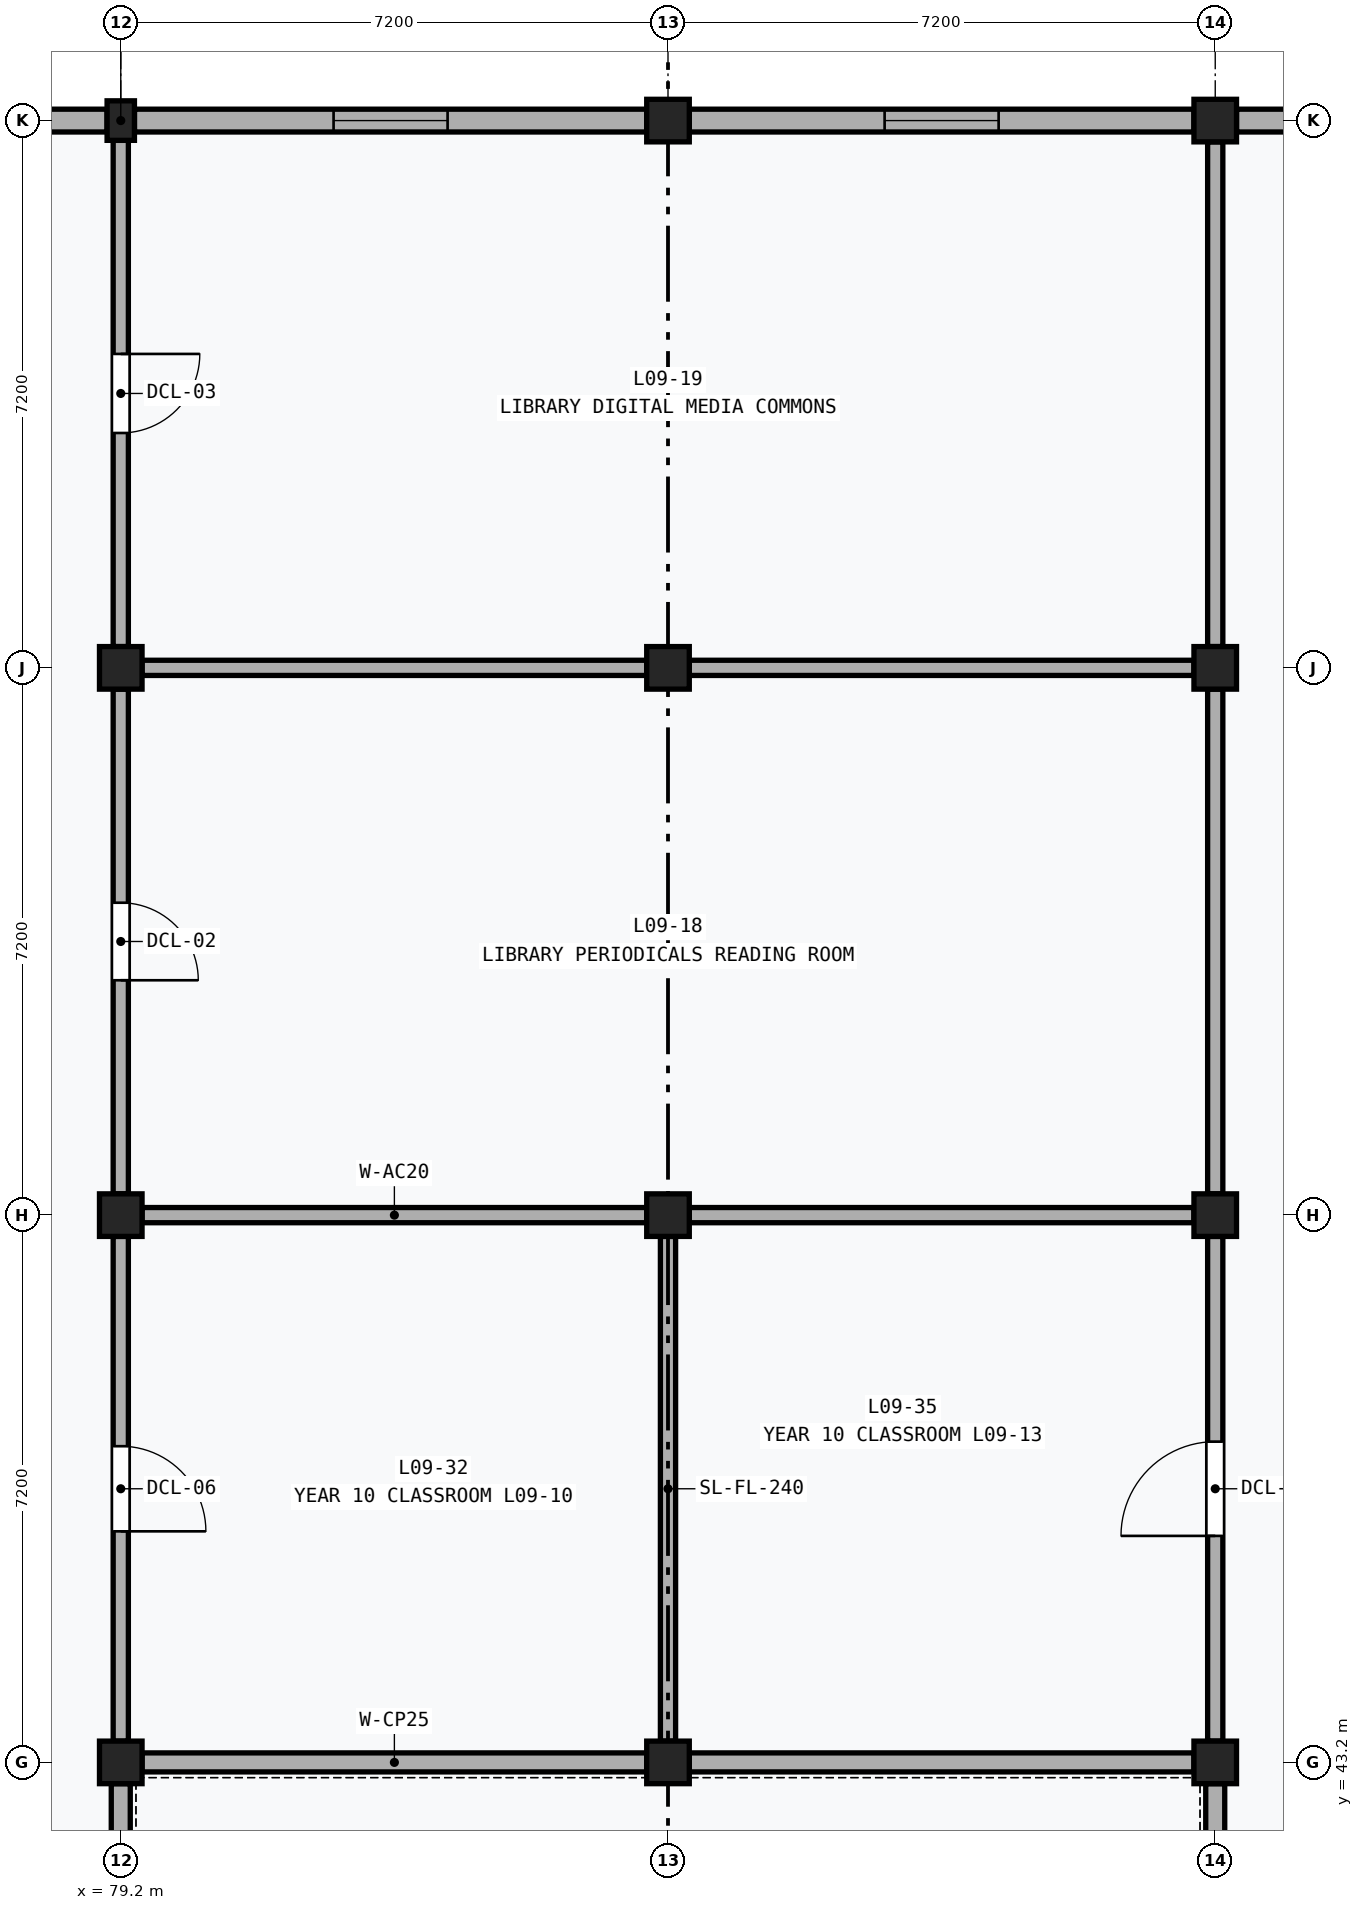
"""IFC4 building model, lengths in metres.
Left out: names, types, materials, properties, quantities, classifications, styles, units other than length and angle.
Written with IfcOpenShell. Run it as: python <this file> out.ifc"""

import sys

from ifc_helpers import new_model, si_unit, direction, frame, frame_2d, origin, origin_2d, place, context, subcontext, project, spatial, rectangle, extrude, element, fill, save


model = new_model("IFC4")
c1 = context("Model", 3, precision=1e-05, world=origin(), true_north=direction((0.0, 1.0)))
c2 = subcontext(c1, "Body", "Model", "MODEL_VIEW")
j1 = project(units=[si_unit("LENGTHUNIT", "METRE"), si_unit("PLANEANGLEUNIT", "RADIAN")], contexts=[c1])
p1 = place(None, origin())
s1 = spatial("IfcSite", under=j1, at=p1, CompositionType="ELEMENT")
p2 = place(p1, origin())
s2 = spatial("IfcBuilding", under=s1, at=p2, CompositionType="ELEMENT")
p3 = place(p2, frame((0.0, 0.0, 38.8)))
s3 = spatial("IfcBuildingStorey", under=s2, at=p3, CompositionType="ELEMENT", Elevation=38.8)
for number, where, z_axis, x_axis in (
    (1, (79.2, 43.2, 0.0), (0.0, 0.0, 1.0), (1.0, 0.0, 0.0)),
    (2, (79.2, 50.4, 0.0), (0.0, 0.0, 1.0), (1.0, 0.0, 0.0)),
    (3, (79.2, 57.6, 0.0), (0.0, 0.0, 1.0), (1.0, 0.0, 0.0)),
):
    element("IfcColumn", number, at=place(p3, frame(where, z_axis=z_axis, x_axis=x_axis)), inside=s3, PredefinedType="COLUMN", context=c2, shape_type="SweptSolid", body=[
        extrude(rectangle(XDim=0.56, YDim=0.56, at=origin_2d()), origin(), (0.0, 0.0, 1.0), 4.0),
    ])
p4 = place(p3, frame((79.2, 64.8, 0.0), z_axis=(0.0, 0.0, 1.0), x_axis=(1.0, 0.0, 0.0)))
e4 = element("IfcColumn", 4, at=p4, inside=s3, PredefinedType="PILASTER", context=c2, shape_type="SweptSolid", body=[
    extrude(rectangle(XDim=0.36, YDim=0.52, at=origin_2d()), origin(), (0.0, 0.0, 1.0), 4.0),
])
for number, where, z_axis, x_axis in (
    (5, (86.4, 43.2, 0.0), (0.0, 0.0, 1.0), (1.0, 0.0, 0.0)),
    (6, (86.4, 50.4, 0.0), (0.0, 0.0, 1.0), (1.0, 0.0, 0.0)),
    (7, (86.4, 57.6, 0.0), (0.0, 0.0, 1.0), (1.0, 0.0, 0.0)),
    (8, (86.4, 64.8, 0.0), (0.0, 0.0, 1.0), (1.0, 0.0, 0.0)),
    (9, (93.6, 43.2, 0.0), (0.0, 0.0, 1.0), (1.0, 0.0, 0.0)),
    (10, (93.6, 50.4, 0.0), (0.0, 0.0, 1.0), (1.0, 0.0, 0.0)),
    (11, (93.6, 57.6, 0.0), (0.0, 0.0, 1.0), (1.0, 0.0, 0.0)),
    (12, (93.6, 64.8, 0.0), (0.0, 0.0, 1.0), (1.0, 0.0, 0.0)),
):
    element("IfcColumn", number, at=place(p3, frame(where, z_axis=z_axis, x_axis=x_axis)), inside=s3, PredefinedType="COLUMN", context=c2, shape_type="SweptSolid", body=[
        extrude(rectangle(XDim=0.56, YDim=0.56, at=origin_2d()), origin(), (0.0, 0.0, 1.0), 4.0),
    ])
p5 = place(p3, frame((72.28, 64.8, 0.0), z_axis=(0.0, 0.0, 1.0), x_axis=(1.0, 0.0, 0.0)))
e13 = element("IfcWall", 13, at=p5, inside=s3, PredefinedType="SOLIDWALL", context=c2, shape_type="SweptSolid", body=[
    extrude(rectangle(XDim=6.74, YDim=0.3, at=frame_2d((3.37, 0.0))), origin(), (0.0, 0.0, 1.0), 3.17),
])
p6 = place(p5, frame((2.62, 0.0, 1.1)))
e14 = element("IfcOpeningElement", 14, at=p6, cuts=e13, PredefinedType="OPENING", context=c2, shape_type="SweptSolid", body=[
    extrude(rectangle(XDim=1.5, YDim=1.35, at=frame_2d((0.75, 0.675))), frame((0.0, 0.162, 0.0), z_axis=(0.0, -1.0, 0.0), x_axis=(1.0, 0.0, 0.0)), (0.0, 0.0, 1.0), 0.324),
])
p7 = place(p3, frame((79.38, 64.8, 0.0), z_axis=(0.0, 0.0, 1.0), x_axis=(1.0, 0.0, 0.0)))
e15 = element("IfcWall", 15, at=p7, inside=s3, PredefinedType="SOLIDWALL", context=c2, shape_type="SweptSolid", body=[
    extrude(rectangle(XDim=6.74, YDim=0.3, at=frame_2d((3.37, 0.0))), origin(), (0.0, 0.0, 1.0), 3.17),
])
p8 = place(p7, frame((2.62, 0.0, 1.1)))
e16 = element("IfcOpeningElement", 16, at=p8, cuts=e15, PredefinedType="OPENING", context=c2, shape_type="SweptSolid", body=[
    extrude(rectangle(XDim=1.5, YDim=1.35, at=frame_2d((0.75, 0.675))), frame((0.0, 0.162, 0.0), z_axis=(0.0, -1.0, 0.0), x_axis=(1.0, 0.0, 0.0)), (0.0, 0.0, 1.0), 0.324),
])
p9 = place(p3, frame((86.68, 64.8, 0.0), z_axis=(0.0, 0.0, 1.0), x_axis=(1.0, 0.0, 0.0)))
e17 = element("IfcWall", 17, at=p9, inside=s3, PredefinedType="SOLIDWALL", context=c2, shape_type="SweptSolid", body=[
    extrude(rectangle(XDim=6.64, YDim=0.3, at=frame_2d((3.32, 0.0))), origin(), (0.0, 0.0, 1.0), 3.17),
])
p10 = place(p9, frame((2.57, 0.0, 1.1)))
e18 = element("IfcOpeningElement", 18, at=p10, cuts=e17, PredefinedType="OPENING", context=c2, shape_type="SweptSolid", body=[
    extrude(rectangle(XDim=1.5, YDim=1.35, at=frame_2d((0.75, 0.675))), frame((0.0, 0.162, 0.0), z_axis=(0.0, -1.0, 0.0), x_axis=(1.0, 0.0, 0.0)), (0.0, 0.0, 1.0), 0.324),
])
p11 = place(p3, frame((93.88, 64.8, 0.0), z_axis=(0.0, 0.0, 1.0), x_axis=(1.0, 0.0, 0.0)))
e19 = element("IfcWall", 19, at=p11, inside=s3, PredefinedType="SOLIDWALL", context=c2, shape_type="SweptSolid", body=[
    extrude(rectangle(XDim=6.64, YDim=0.3, at=frame_2d((3.32, 0.0))), origin(), (0.0, 0.0, 1.0), 3.17),
])
p12 = place(p11, frame((2.42, 0.0, 0.9)))
e20 = element("IfcOpeningElement", 20, at=p12, cuts=e19, PredefinedType="OPENING", context=c2, shape_type="SweptSolid", body=[
    extrude(rectangle(XDim=1.8, YDim=1.8, at=frame_2d((0.9, 0.9))), frame((0.0, 0.162, 0.0), z_axis=(0.0, -1.0, 0.0), x_axis=(1.0, 0.0, 0.0)), (0.0, 0.0, 1.0), 0.324),
])
p13 = place(p3, frame((79.48, 43.2, 0.0), z_axis=(0.0, 0.0, 1.0), x_axis=(1.0, 0.0, 0.0)))
e21 = element("IfcWall", 21, at=p13, inside=s3, PredefinedType="PARTITIONING", context=c2, shape_type="SweptSolid", body=[
    extrude(rectangle(XDim=6.64, YDim=0.25, at=frame_2d((3.32, 0.0))), origin(), (0.0, 0.0, 1.0), 3.01),
])
p14 = place(p3, frame((79.2, 36.28, 0.0), z_axis=(0.0, 0.0, 1.0), x_axis=(0.0, 1.0, 0.0)))
e22 = element("IfcWall", 22, at=p14, inside=s3, PredefinedType="PARTITIONING", context=c2, shape_type="SweptSolid", body=[
    extrude(rectangle(XDim=6.64, YDim=0.25, at=frame_2d((3.32, 0.0))), origin(), (0.0, 0.0, 1.0), 3.01),
])
p15 = place(p3, frame((86.68, 43.2, 0.0), z_axis=(0.0, 0.0, 1.0), x_axis=(1.0, 0.0, 0.0)))
e23 = element("IfcWall", 23, at=p15, inside=s3, PredefinedType="PARTITIONING", context=c2, shape_type="SweptSolid", body=[
    extrude(rectangle(XDim=6.64, YDim=0.25, at=frame_2d((3.32, 0.0))), origin(), (0.0, 0.0, 1.0), 3.01),
])
p16 = place(p3, frame((93.6, 36.28, 0.0), z_axis=(0.0, 0.0, 1.0), x_axis=(0.0, 1.0, 0.0)))
e24 = element("IfcWall", 24, at=p16, inside=s3, PredefinedType="PARTITIONING", context=c2, shape_type="SweptSolid", body=[
    extrude(rectangle(XDim=6.64, YDim=0.25, at=frame_2d((3.32, 0.0))), origin(), (0.0, 0.0, 1.0), 3.01),
])
for number, where, z_axis, x_axis in (
    (25, (79.48, 50.4, 0.0), (0.0, 0.0, 1.0), (1.0, 0.0, 0.0)),
    (26, (79.48, 57.6, 0.0), (0.0, 0.0, 1.0), (1.0, 0.0, 0.0)),
):
    element("IfcWall", number, at=place(p3, frame(where, z_axis=z_axis, x_axis=x_axis)), inside=s3, PredefinedType="PARTITIONING", context=c2, shape_type="SweptSolid", body=[
        extrude(rectangle(XDim=6.64, YDim=0.2, at=frame_2d((3.32, 0.0))), origin(), (0.0, 0.0, 1.0), 3.01),
    ])
p17 = place(p3, frame((79.2, 50.68, 0.0), z_axis=(0.0, 0.0, 1.0), x_axis=(0.0, 1.0, 0.0)))
e27 = element("IfcWall", 27, at=p17, inside=s3, PredefinedType="PARTITIONING", context=c2, shape_type="SweptSolid", body=[
    extrude(rectangle(XDim=6.64, YDim=0.2, at=frame_2d((3.32, 0.0))), origin(), (0.0, 0.0, 1.0), 3.01),
])
p18 = place(p17, frame((2.81, 0.0, 0.0)))
e28 = element("IfcOpeningElement", 28, at=p18, cuts=e27, PredefinedType="OPENING", context=c2, shape_type="SweptSolid", body=[
    extrude(rectangle(XDim=1.02, YDim=2.12, at=frame_2d((0.51, 1.06))), frame((0.0, 0.112, 0.0), z_axis=(0.0, -1.0, 0.0), x_axis=(1.0, 0.0, 0.0)), (0.0, 0.0, 1.0), 0.224),
])
for number, where, z_axis, x_axis in (
    (29, (86.68, 50.4, 0.0), (0.0, 0.0, 1.0), (1.0, 0.0, 0.0)),
    (30, (86.68, 57.6, 0.0), (0.0, 0.0, 1.0), (1.0, 0.0, 0.0)),
    (31, (93.6, 50.68, 0.0), (0.0, 0.0, 1.0), (0.0, 1.0, 0.0)),
):
    element("IfcWall", number, at=place(p3, frame(where, z_axis=z_axis, x_axis=x_axis)), inside=s3, PredefinedType="PARTITIONING", context=c2, shape_type="SweptSolid", body=[
        extrude(rectangle(XDim=6.64, YDim=0.2, at=frame_2d((3.32, 0.0))), origin(), (0.0, 0.0, 1.0), 3.01),
    ])
p19 = place(p3, frame((79.2, 57.88, 0.0), z_axis=(0.0, 0.0, 1.0), x_axis=(0.0, 1.0, 0.0)))
e32 = element("IfcWall", 32, at=p19, inside=s3, PredefinedType="PARTITIONING", context=c2, shape_type="SweptSolid", body=[
    extrude(rectangle(XDim=6.66, YDim=0.2, at=frame_2d((3.33, 0.0))), origin(), (0.0, 0.0, 1.0), 3.01),
])
p20 = place(p19, frame((2.81, 0.0, 0.0)))
e33 = element("IfcOpeningElement", 33, at=p20, cuts=e32, PredefinedType="OPENING", context=c2, shape_type="SweptSolid", body=[
    extrude(rectangle(XDim=1.04, YDim=2.14, at=frame_2d((0.52, 1.07))), frame((0.0, 0.112, 0.0), z_axis=(0.0, -1.0, 0.0), x_axis=(1.0, 0.0, 0.0)), (0.0, 0.0, 1.0), 0.224),
])
p21 = place(p3, frame((93.6, 57.88, 0.0), z_axis=(0.0, 0.0, 1.0), x_axis=(0.0, 1.0, 0.0)))
e34 = element("IfcWall", 34, at=p21, inside=s3, PredefinedType="PARTITIONING", context=c2, shape_type="SweptSolid", body=[
    extrude(rectangle(XDim=6.64, YDim=0.2, at=frame_2d((3.32, 0.0))), origin(), (0.0, 0.0, 1.0), 3.01),
])
p22 = place(p3, frame((79.2, 43.48, 0.0), z_axis=(0.0, 0.0, 1.0), x_axis=(0.0, 1.0, 0.0)))
e35 = element("IfcWall", 35, at=p22, inside=s3, PredefinedType="PARTITIONING", context=c2, shape_type="SweptSolid", body=[
    extrude(rectangle(XDim=6.64, YDim=0.2, at=frame_2d((3.32, 0.0))), origin(), (0.0, 0.0, 1.0), 3.01),
])
p23 = place(p22, frame((2.76, 0.0, 0.0)))
e36 = element("IfcOpeningElement", 36, at=p23, cuts=e35, PredefinedType="OPENING", context=c2, shape_type="SweptSolid", body=[
    extrude(rectangle(XDim=1.12, YDim=2.2, at=frame_2d((0.56, 1.1))), frame((0.0, 0.112, 0.0), z_axis=(0.0, -1.0, 0.0), x_axis=(1.0, 0.0, 0.0)), (0.0, 0.0, 1.0), 0.224),
])
p24 = place(p3, frame((86.4, 43.48, 0.0), z_axis=(0.0, 0.0, 1.0), x_axis=(0.0, 1.0, 0.0)))
e37 = element("IfcWall", 37, at=p24, inside=s3, PredefinedType="PARTITIONING", context=c2, shape_type="SweptSolid", body=[
    extrude(rectangle(XDim=6.64, YDim=0.2, at=frame_2d((3.32, 0.0))), origin(), (0.0, 0.0, 1.0), 3.01),
])
p25 = place(p3, frame((93.6, 43.48, 0.0), z_axis=(0.0, 0.0, 1.0), x_axis=(0.0, 1.0, 0.0)))
e38 = element("IfcWall", 38, at=p25, inside=s3, PredefinedType="PARTITIONING", context=c2, shape_type="SweptSolid", body=[
    extrude(rectangle(XDim=6.64, YDim=0.2, at=frame_2d((3.32, 0.0))), origin(), (0.0, 0.0, 1.0), 3.01),
])
p26 = place(p25, frame((2.7, 0.0, 0.0)))
e39 = element("IfcOpeningElement", 39, at=p26, cuts=e38, PredefinedType="OPENING", context=c2, shape_type="SweptSolid", body=[
    extrude(rectangle(XDim=1.24, YDim=2.26, at=frame_2d((0.62, 1.13))), frame((0.0, 0.112, 0.0), z_axis=(0.0, -1.0, 0.0), x_axis=(1.0, 0.0, 0.0)), (0.0, 0.0, 1.0), 0.224),
])
p27 = place(p8, origin())
e40 = element("IfcWindow", 40, at=p27, inside=s3, PartitioningType="SINGLE_PANEL", PredefinedType="WINDOW", context=c2, shape_type="SweptSolid", body=[
    extrude(rectangle(XDim=1.5, YDim=1.35, at=frame_2d((0.75, 0.675))), frame((0.0, 0.03, 0.0), z_axis=(0.0, -1.0, 0.0), x_axis=(1.0, 0.0, 0.0)), (0.0, 0.0, 1.0), 0.06),
])
fill(e16, e40)
p28 = place(p10, origin())
e41 = element("IfcWindow", 41, at=p28, inside=s3, PartitioningType="SINGLE_PANEL", PredefinedType="WINDOW", context=c2, shape_type="SweptSolid", body=[
    extrude(rectangle(XDim=1.5, YDim=1.35, at=frame_2d((0.75, 0.675))), frame((0.0, 0.03, 0.0), z_axis=(0.0, -1.0, 0.0), x_axis=(1.0, 0.0, 0.0)), (0.0, 0.0, 1.0), 0.06),
])
fill(e18, e41)
p29 = place(p18, frame((1.02, 0.0, 0.0), z_axis=(0.0, 0.0, 1.0), x_axis=(-1.0, 0.0, 0.0)))
e42 = element("IfcDoor", 42, at=p29, inside=s3, OperationType="SINGLE_SWING_RIGHT", PredefinedType="DOOR", context=c2, shape_type="SweptSolid", body=[
    extrude(rectangle(XDim=1.02, YDim=2.12, at=frame_2d((0.51, 1.06))), frame((0.0, 0.025, 0.0), z_axis=(0.0, -1.0, 0.0), x_axis=(1.0, 0.0, 0.0)), (0.0, 0.0, 1.0), 0.05),
])
fill(e28, e42)
p30 = place(p20, frame((1.04, 0.0, 0.0), z_axis=(0.0, 0.0, 1.0), x_axis=(-1.0, 0.0, 0.0)))
e43 = element("IfcDoor", 43, at=p30, inside=s3, OperationType="SINGLE_SWING_LEFT", PredefinedType="DOOR", context=c2, shape_type="SweptSolid", body=[
    extrude(rectangle(XDim=1.04, YDim=2.14, at=frame_2d((0.52, 1.07))), frame((0.0, 0.025, 0.0), z_axis=(0.0, -1.0, 0.0), x_axis=(1.0, 0.0, 0.0)), (0.0, 0.0, 1.0), 0.05),
])
fill(e33, e43)
p31 = place(p23, frame((1.12, 0.0, 0.0), z_axis=(0.0, 0.0, 1.0), x_axis=(-1.0, 0.0, 0.0)))
e44 = element("IfcDoor", 44, at=p31, inside=s3, OperationType="SINGLE_SWING_RIGHT", PredefinedType="DOOR", context=c2, shape_type="SweptSolid", body=[
    extrude(rectangle(XDim=1.12, YDim=2.2, at=frame_2d((0.56, 1.1))), frame((0.0, 0.025, 0.0), z_axis=(0.0, -1.0, 0.0), x_axis=(1.0, 0.0, 0.0)), (0.0, 0.0, 1.0), 0.05),
])
fill(e36, e44)
p32 = place(p26, origin())
e45 = element("IfcDoor", 45, at=p32, inside=s3, OperationType="SINGLE_SWING_LEFT", PredefinedType="DOOR", context=c2, shape_type="SweptSolid", body=[
    extrude(rectangle(XDim=1.24, YDim=2.26, at=frame_2d((0.62, 1.13))), frame((0.0, 0.025, 0.0), z_axis=(0.0, -1.0, 0.0), x_axis=(1.0, 0.0, 0.0)), (0.0, 0.0, 1.0), 0.05),
])
fill(e39, e45)
save(model, sys.argv[1])
